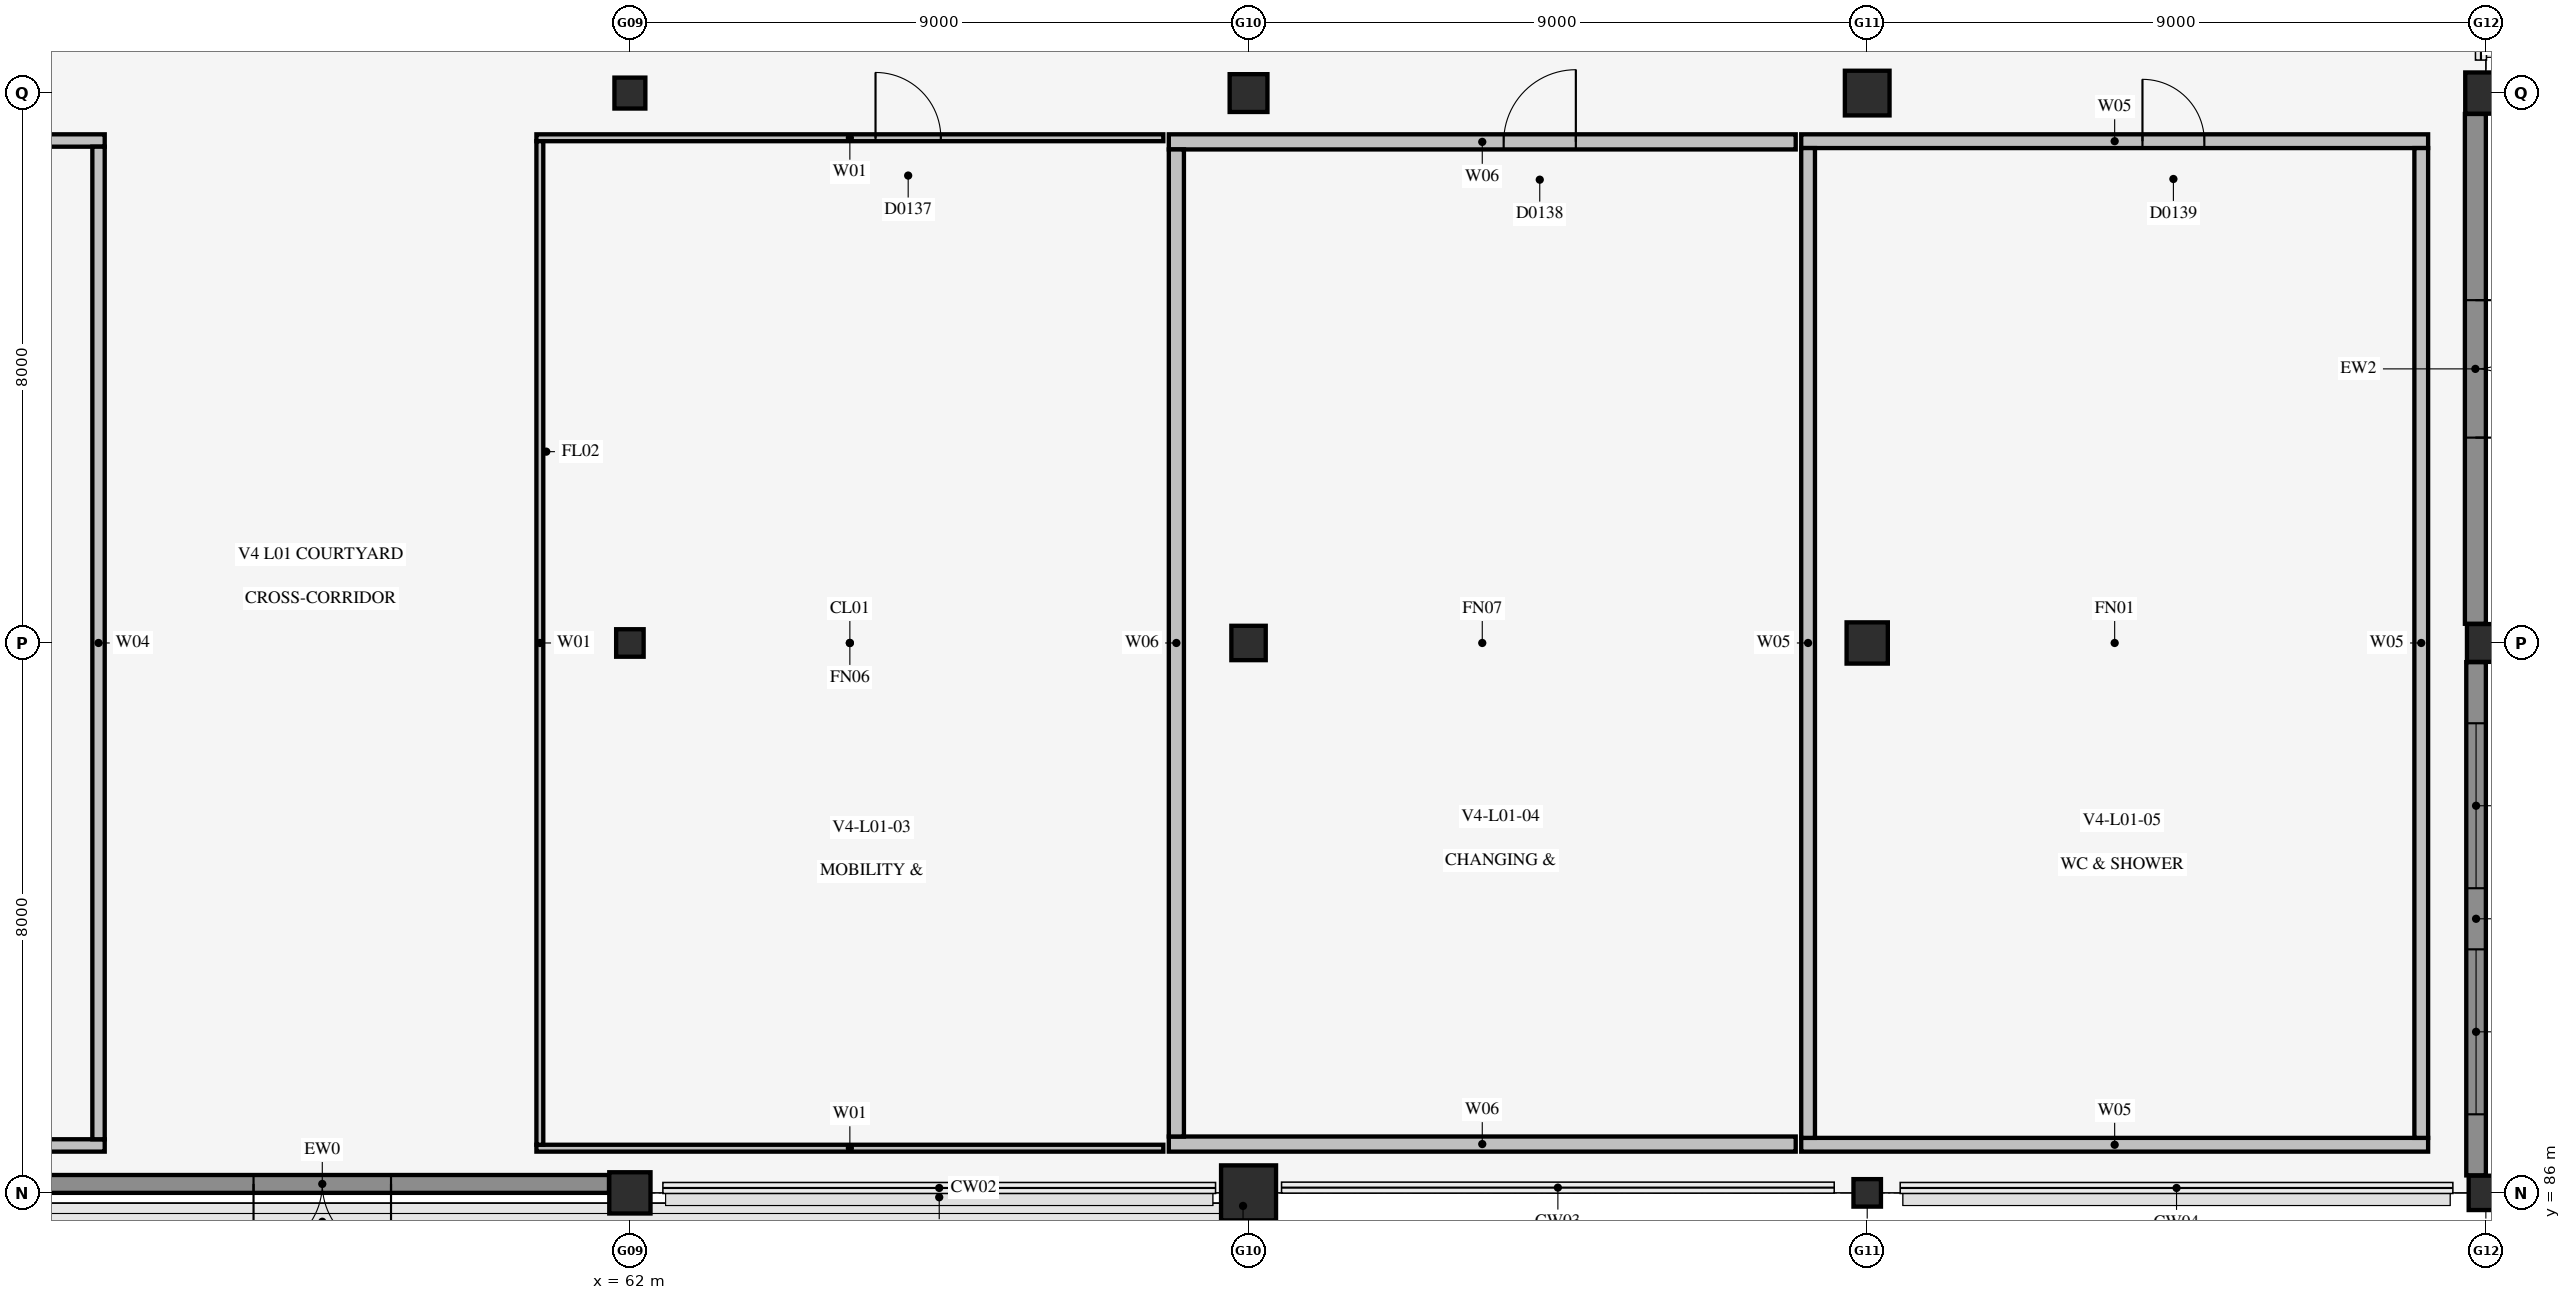
"""IFC4 building model, lengths in metres.
Left out: names, types, materials, properties, quantities, classifications, styles, units other than length and angle.
Written with IfcOpenShell. Run it as: python <this file> out.ifc"""

import sys

from ifc_helpers import new_model, si_unit, direction, frame, frame_2d, origin, origin_2d, place, context, subcontext, project, spatial, rectangle, circle, extrude, element, fill, save


model = new_model("IFC4")
c1 = context("Model", 3, precision=1e-05, world=origin(), true_north=direction((0.0, 1.0)))
c2 = subcontext(c1, "Body", "Model", "MODEL_VIEW")
j1 = project(units=[si_unit("LENGTHUNIT", "METRE"), si_unit("PLANEANGLEUNIT", "RADIAN")], contexts=[c1])
p1 = place(None, origin())
s1 = spatial("IfcSite", under=j1, at=p1, CompositionType="ELEMENT")
p2 = place(p1, origin())
s2 = spatial("IfcBuilding", under=s1, at=p2, CompositionType="ELEMENT")
p3 = place(p2, frame((0.0, 0.0, 5.4)))
s3 = spatial("IfcBuildingStorey", under=s2, at=p3, CompositionType="ELEMENT", Elevation=5.4)
p4 = place(p3, frame((62.0, 86.0, 0.0), z_axis=(0.0, 0.0, 1.0), x_axis=(1.0, 0.0, 0.0)))
e1 = element("IfcColumn", 1, at=p4, inside=s3, PredefinedType="COLUMN", context=c2, shape_type="SweptSolid", body=[
    extrude(circle(Radius=0.3, at=origin_2d()), origin(), (0.0, 0.0, 1.0), 4.5),
])
p5 = place(p3, frame((62.0, 94.0, 0.0), z_axis=(0.0, 0.0, 1.0), x_axis=(1.0, 0.0, 0.0)))
e2 = element("IfcColumn", 2, at=p5, inside=s3, PredefinedType="COLUMN", context=c2, shape_type="SweptSolid", body=[
    extrude(rectangle(XDim=0.4, YDim=0.4, at=origin_2d()), origin(), (0.0, 0.0, 1.0), 4.8),
])
p6 = place(p3, frame((62.0, 102.0, 0.0), z_axis=(0.0, 0.0, 1.0), x_axis=(1.0, 0.0, 0.0)))
e3 = element("IfcColumn", 3, at=p6, inside=s3, PredefinedType="COLUMN", context=c2, shape_type="SweptSolid", body=[
    extrude(rectangle(XDim=0.45, YDim=0.45, at=origin_2d()), origin(), (0.0, 0.0, 1.0), 4.8),
])
p7 = place(p3, frame((71.0, 86.0, 0.0), z_axis=(0.0, 0.0, 1.0), x_axis=(1.0, 0.0, 0.0)))
e4 = element("IfcColumn", 4, at=p7, inside=s3, PredefinedType="COLUMN", context=c2, shape_type="SweptSolid", body=[
    extrude(circle(Radius=0.4, at=origin_2d()), origin(), (0.0, 0.0, 1.0), 4.5),
])
p8 = place(p3, frame((71.0, 94.0, 0.0), z_axis=(0.0, 0.0, 1.0), x_axis=(1.0, 0.0, 0.0)))
e5 = element("IfcColumn", 5, at=p8, inside=s3, PredefinedType="COLUMN", context=c2, shape_type="SweptSolid", body=[
    extrude(rectangle(XDim=0.5, YDim=0.5, at=origin_2d()), origin(), (0.0, 0.0, 1.0), 4.5),
])
p9 = place(p3, frame((71.0, 102.0, 0.0), z_axis=(0.0, 0.0, 1.0), x_axis=(1.0, 0.0, 0.0)))
e6 = element("IfcColumn", 6, at=p9, inside=s3, PredefinedType="COLUMN", context=c2, shape_type="SweptSolid", body=[
    extrude(rectangle(XDim=0.55, YDim=0.55, at=origin_2d()), origin(), (0.0, 0.0, 1.0), 4.5),
])
p10 = place(p3, frame((80.0, 86.0, 0.0), z_axis=(0.0, 0.0, 1.0), x_axis=(1.0, 0.0, 0.0)))
e7 = element("IfcColumn", 7, at=p10, inside=s3, PredefinedType="COLUMN", context=c2, shape_type="SweptSolid", body=[
    extrude(rectangle(XDim=0.4, YDim=0.4, at=origin_2d()), origin(), (0.0, 0.0, 1.0), 4.5),
])
p11 = place(p3, frame((80.0, 94.0, 0.0), z_axis=(0.0, 0.0, 1.0), x_axis=(1.0, 0.0, 0.0)))
e8 = element("IfcColumn", 8, at=p11, inside=s3, PredefinedType="COLUMN", context=c2, shape_type="SweptSolid", body=[
    extrude(rectangle(XDim=0.6, YDim=0.6, at=origin_2d()), origin(), (0.0, 0.0, 1.0), 4.5),
])
p12 = place(p3, frame((80.0, 102.0, 0.0), z_axis=(0.0, 0.0, 1.0), x_axis=(1.0, 0.0, 0.0)))
e9 = element("IfcColumn", 9, at=p12, inside=s3, PredefinedType="COLUMN", context=c2, shape_type="SweptSolid", body=[
    extrude(rectangle(XDim=0.65, YDim=0.65, at=origin_2d()), origin(), (0.0, 0.0, 1.0), 4.5),
])
p13 = place(p3, frame((89.0, 86.0, 0.0), z_axis=(0.0, 0.0, 1.0), x_axis=(1.0, 0.0, 0.0)))
e10 = element("IfcColumn", 10, at=p13, inside=s3, PredefinedType="COLUMN", context=c2, shape_type="SweptSolid", body=[
    extrude(rectangle(XDim=0.5, YDim=0.5, at=origin_2d()), origin(), (0.0, 0.0, 1.0), 4.5),
])
p14 = place(p3, frame((89.0, 94.0, 0.0), z_axis=(0.0, 0.0, 1.0), x_axis=(1.0, 0.0, 0.0)))
e11 = element("IfcColumn", 11, at=p14, inside=s3, PredefinedType="COLUMN", context=c2, shape_type="SweptSolid", body=[
    extrude(rectangle(XDim=0.55, YDim=0.55, at=origin_2d()), origin(), (0.0, 0.0, 1.0), 4.5),
])
p15 = place(p3, frame((89.0, 102.0, 0.0), z_axis=(0.0, 0.0, 1.0), x_axis=(1.0, 0.0, 0.0)))
e12 = element("IfcColumn", 12, at=p15, inside=s3, PredefinedType="COLUMN", context=c2, shape_type="SweptSolid", body=[
    extrude(rectangle(XDim=0.6, YDim=0.6, at=origin_2d()), origin(), (0.0, 0.0, 1.0), 4.5),
])
p16 = place(p3, frame((32.64, 86.69, 0.0), z_axis=(0.0, 0.0, 1.0), x_axis=(1.0, 0.0, 0.0)))
e13 = element("IfcWall", 13, at=p16, inside=s3, PredefinedType="PARTITIONING", context=c2, shape_type="SweptSolid", body=[
    extrude(rectangle(XDim=21.72, YDim=0.18, at=frame_2d((10.86, 0.0))), origin(), (0.0, 0.0, 1.0), 4.485),
])
p17 = place(p3, frame((32.64, 101.31, 0.0), z_axis=(0.0, 0.0, 1.0), x_axis=(1.0, 0.0, 0.0)))
e14 = element("IfcWall", 14, at=p17, inside=s3, PredefinedType="PARTITIONING", context=c2, shape_type="SweptSolid", body=[
    extrude(rectangle(XDim=21.72, YDim=0.18, at=frame_2d((10.86, 0.0))), origin(), (0.0, 0.0, 1.0), 4.485),
])
p18 = place(p17, frame((8.006, 0.0, 0.0)))
e15 = element("IfcOpeningElement", 15, at=p18, cuts=e14, PredefinedType="OPENING", context=c2, shape_type="SweptSolid", body=[
    extrude(rectangle(XDim=1.0, YDim=2.2, at=frame_2d((0.5, 1.1))), frame((0.0, 0.102, 0.0), z_axis=(0.0, -1.0, 0.0), x_axis=(1.0, 0.0, 0.0)), (0.0, 0.0, 1.0), 0.204),
])
p19 = place(p3, frame((54.27, 86.78, 0.0), z_axis=(0.0, 0.0, 1.0), x_axis=(0.0, 1.0, 0.0)))
e16 = element("IfcWall", 16, at=p19, inside=s3, PredefinedType="PARTITIONING", context=c2, shape_type="SweptSolid", body=[
    extrude(rectangle(XDim=14.44, YDim=0.18, at=frame_2d((7.22, 0.0))), origin(), (0.0, 0.0, 1.0), 4.485),
])
p20 = place(p3, frame((60.64, 86.65, 0.0), z_axis=(0.0, 0.0, 1.0), x_axis=(1.0, 0.0, 0.0)))
e17 = element("IfcWall", 17, at=p20, inside=s3, PredefinedType="PARTITIONING", context=c2, shape_type="SweptSolid", body=[
    extrude(rectangle(XDim=9.12, YDim=0.1, at=frame_2d((4.56, 0.0))), origin(), (0.0, 0.0, 1.0), 4.485),
])
p21 = place(p3, frame((60.64, 101.35, 0.0), z_axis=(0.0, 0.0, 1.0), x_axis=(1.0, 0.0, 0.0)))
e18 = element("IfcWall", 18, at=p21, inside=s3, PredefinedType="PARTITIONING", context=c2, shape_type="SweptSolid", body=[
    extrude(rectangle(XDim=9.12, YDim=0.1, at=frame_2d((4.56, 0.0))), origin(), (0.0, 0.0, 1.0), 4.485),
])
p22 = place(p21, frame((4.933, 0.0, 0.0)))
e19 = element("IfcOpeningElement", 19, at=p22, cuts=e18, PredefinedType="OPENING", context=c2, shape_type="SweptSolid", body=[
    extrude(rectangle(XDim=0.95, YDim=2.15, at=frame_2d((0.475, 1.075))), frame((0.0, 0.062, 0.0), z_axis=(0.0, -1.0, 0.0), x_axis=(1.0, 0.0, 0.0)), (0.0, 0.0, 1.0), 0.124),
])
p23 = place(p3, frame((60.69, 86.7, 0.0), z_axis=(0.0, 0.0, 1.0), x_axis=(0.0, 1.0, 0.0)))
e20 = element("IfcWall", 20, at=p23, inside=s3, PredefinedType="PARTITIONING", context=c2, shape_type="SweptSolid", body=[
    extrude(rectangle(XDim=14.6, YDim=0.1, at=frame_2d((7.3, 0.0))), origin(), (0.0, 0.0, 1.0), 4.485),
])
p24 = place(p3, frame((69.84, 86.71, 0.0), z_axis=(0.0, 0.0, 1.0), x_axis=(1.0, 0.0, 0.0)))
e21 = element("IfcWall", 21, at=p24, inside=s3, PredefinedType="PLUMBINGWALL", context=c2, shape_type="SweptSolid", body=[
    extrude(rectangle(XDim=9.12, YDim=0.22, at=frame_2d((4.56, 0.0))), origin(), (0.0, 0.0, 1.0), 4.485),
])
p25 = place(p3, frame((69.84, 101.29, 0.0), z_axis=(0.0, 0.0, 1.0), x_axis=(1.0, 0.0, 0.0)))
e22 = element("IfcWall", 22, at=p25, inside=s3, PredefinedType="PLUMBINGWALL", context=c2, shape_type="SweptSolid", body=[
    extrude(rectangle(XDim=9.12, YDim=0.22, at=frame_2d((4.56, 0.0))), origin(), (0.0, 0.0, 1.0), 4.485),
])
p26 = place(p25, frame((4.871, 0.0, 0.0)))
e23 = element("IfcOpeningElement", 23, at=p26, cuts=e22, PredefinedType="OPENING", context=c2, shape_type="SweptSolid", body=[
    extrude(rectangle(XDim=1.05, YDim=2.15, at=frame_2d((0.525, 1.075))), frame((0.0, 0.122, 0.0), z_axis=(0.0, -1.0, 0.0), x_axis=(1.0, 0.0, 0.0)), (0.0, 0.0, 1.0), 0.244),
])
p27 = place(p3, frame((69.95, 86.82, 0.0), z_axis=(0.0, 0.0, 1.0), x_axis=(0.0, 1.0, 0.0)))
e24 = element("IfcWall", 24, at=p27, inside=s3, PredefinedType="PLUMBINGWALL", context=c2, shape_type="SweptSolid", body=[
    extrude(rectangle(XDim=14.36, YDim=0.22, at=frame_2d((7.18, 0.0))), origin(), (0.0, 0.0, 1.0), 4.485),
])
p28 = place(p3, frame((79.04, 86.7, 0.0), z_axis=(0.0, 0.0, 1.0), x_axis=(1.0, 0.0, 0.0)))
e25 = element("IfcWall", 25, at=p28, inside=s3, PredefinedType="PLUMBINGWALL", context=c2, shape_type="SweptSolid", body=[
    extrude(rectangle(XDim=9.12, YDim=0.2, at=frame_2d((4.56, 0.0))), origin(), (0.0, 0.0, 1.0), 4.485),
])
p29 = place(p3, frame((79.04, 101.3, 0.0), z_axis=(0.0, 0.0, 1.0), x_axis=(1.0, 0.0, 0.0)))
e26 = element("IfcWall", 26, at=p29, inside=s3, PredefinedType="PLUMBINGWALL", context=c2, shape_type="SweptSolid", body=[
    extrude(rectangle(XDim=9.12, YDim=0.2, at=frame_2d((4.56, 0.0))), origin(), (0.0, 0.0, 1.0), 4.485),
])
p30 = place(p29, frame((4.964, 0.0, 0.0)))
e27 = element("IfcOpeningElement", 27, at=p30, cuts=e26, PredefinedType="OPENING", context=c2, shape_type="SweptSolid", body=[
    extrude(rectangle(XDim=0.9, YDim=2.1, at=frame_2d((0.45, 1.05))), frame((0.0, 0.112, 0.0), z_axis=(0.0, -1.0, 0.0), x_axis=(1.0, 0.0, 0.0)), (0.0, 0.0, 1.0), 0.224),
])
for number, where, z_axis, x_axis in (
    (28, (88.06, 86.8, 0.0), (0.0, 0.0, 1.0), (0.0, 1.0, 0.0)),
    (29, (79.14, 86.8, 0.0), (0.0, 0.0, 1.0), (0.0, 1.0, 0.0)),
):
    element("IfcWall", number, at=place(p3, frame(where, z_axis=z_axis, x_axis=x_axis)), inside=s3, PredefinedType="PLUMBINGWALL", context=c2, shape_type="SweptSolid", body=[
        extrude(rectangle(XDim=14.4, YDim=0.2, at=frame_2d((7.2, 0.0))), origin(), (0.0, 0.0, 1.0), 4.485),
    ])
p31 = place(p3, frame((53.354, 86.13, 0.0), z_axis=(0.0, 0.0, 1.0), x_axis=(1.0, 0.0, 0.0)))
e30 = element("IfcWall", 30, at=p31, inside=s3, PredefinedType="SOLIDWALL", context=c2, shape_type="SweptSolid", body=[
    extrude(rectangle(XDim=8.342, YDim=0.26, at=frame_2d((4.171, 0.0))), origin(), (0.0, 0.0, 1.0), 3.934),
])
p32 = place(p31, frame((3.171, 0.0, 0.0)))
e31 = element("IfcOpeningElement", 31, at=p32, cuts=e30, PredefinedType="OPENING", context=c2, shape_type="SweptSolid", body=[
    extrude(rectangle(XDim=2.0, YDim=2.4, at=frame_2d((1.0, 1.2))), frame((0.0, 0.142, 0.0), z_axis=(0.0, -1.0, 0.0), x_axis=(1.0, 0.0, 0.0)), (0.0, 0.0, 1.0), 0.284),
])
p33 = place(p3, frame((88.857, 86.254, 0.0), z_axis=(0.0, 0.0, 1.0), x_axis=(0.0, 1.0, 0.0)))
e32 = element("IfcWall", 32, at=p33, inside=s3, PredefinedType="SOLIDWALL", context=c2, shape_type="SweptSolid", body=[
    extrude(rectangle(XDim=7.467, YDim=0.285, at=frame_2d((3.733, 0.0))), origin(), (0.0, 0.0, 1.0), 3.858),
])
p34 = place(p33, frame((0.889, 0.0, 0.95)))
e33 = element("IfcOpeningElement", 33, at=p34, cuts=e32, PredefinedType="OPENING", context=c2, shape_type="SweptSolid", body=[
    extrude(rectangle(XDim=2.4, YDim=2.1, at=frame_2d((1.2, 1.05))), frame((0.0, 0.154, 0.0), z_axis=(0.0, -1.0, 0.0), x_axis=(1.0, 0.0, 0.0)), (0.0, 0.0, 1.0), 0.309),
])
p35 = place(p33, frame((4.178, 0.0, 0.95)))
e34 = element("IfcOpeningElement", 34, at=p35, cuts=e32, PredefinedType="OPENING", context=c2, shape_type="SweptSolid", body=[
    extrude(rectangle(XDim=2.4, YDim=2.1, at=frame_2d((1.2, 1.05))), frame((0.0, 0.154, 0.0), z_axis=(0.0, -1.0, 0.0), x_axis=(1.0, 0.0, 0.0)), (0.0, 0.0, 1.0), 0.309),
])
p36 = place(p3, frame((88.847, 94.279, 0.0), z_axis=(0.0, 0.0, 1.0), x_axis=(0.0, 1.0, 0.0)))
e35 = element("IfcWall", 35, at=p36, inside=s3, PredefinedType="SOLIDWALL", context=c2, shape_type="SweptSolid", body=[
    extrude(rectangle(XDim=7.417, YDim=0.305, at=frame_2d((3.708, 0.0))), origin(), (0.0, 0.0, 1.0), 4.057),
])
p37 = place(p36, frame((2.708, 0.0, 0.0)))
e36 = element("IfcOpeningElement", 36, at=p37, cuts=e35, PredefinedType="OPENING", context=c2, shape_type="SweptSolid", body=[
    extrude(rectangle(XDim=2.0, YDim=2.4, at=frame_2d((1.0, 1.2))), frame((0.0, 0.165, 0.0), z_axis=(0.0, -1.0, 0.0), x_axis=(1.0, 0.0, 0.0)), (0.0, 0.0, 1.0), 0.329),
])
p38 = place(p22, frame((0.95, 0.0, 0.0), z_axis=(0.0, 0.0, 1.0), x_axis=(-1.0, 0.0, 0.0)))
e37 = element("IfcDoor", 37, at=p38, inside=s3, OperationType="SINGLE_SWING_LEFT", PredefinedType="DOOR", context=c2, shape_type="SweptSolid", body=[
    extrude(rectangle(XDim=0.95, YDim=2.15, at=frame_2d((0.475, 1.075))), frame((0.0, 0.025, 0.0), z_axis=(0.0, -1.0, 0.0), x_axis=(1.0, 0.0, 0.0)), (0.0, 0.0, 1.0), 0.05),
])
fill(e19, e37)
p39 = place(p26, frame((1.05, 0.0, 0.0), z_axis=(0.0, 0.0, 1.0), x_axis=(-1.0, 0.0, 0.0)))
e38 = element("IfcDoor", 38, at=p39, inside=s3, OperationType="SINGLE_SWING_RIGHT", PredefinedType="DOOR", context=c2, shape_type="SweptSolid", body=[
    extrude(rectangle(XDim=1.05, YDim=2.15, at=frame_2d((0.525, 1.075))), frame((0.0, 0.025, 0.0), z_axis=(0.0, -1.0, 0.0), x_axis=(1.0, 0.0, 0.0)), (0.0, 0.0, 1.0), 0.05),
])
fill(e23, e38)
p40 = place(p30, frame((0.9, 0.0, 0.0), z_axis=(0.0, 0.0, 1.0), x_axis=(-1.0, 0.0, 0.0)))
e39 = element("IfcDoor", 39, at=p40, inside=s3, OperationType="SINGLE_SWING_LEFT", PredefinedType="DOOR", context=c2, shape_type="SweptSolid", body=[
    extrude(rectangle(XDim=0.9, YDim=2.1, at=frame_2d((0.45, 1.05))), frame((0.0, 0.025, 0.0), z_axis=(0.0, -1.0, 0.0), x_axis=(1.0, 0.0, 0.0)), (0.0, 0.0, 1.0), 0.05),
])
fill(e27, e39)
p41 = place(p32, frame((2.0, 0.0, 0.0), z_axis=(0.0, 0.0, 1.0), x_axis=(-1.0, 0.0, 0.0)))
e40 = element("IfcDoor", 40, at=p41, inside=s3, OperationType="DOUBLE_DOOR_SINGLE_SWING", PredefinedType="DOOR", context=c2, shape_type="SweptSolid", body=[
    extrude(rectangle(XDim=2.0, YDim=2.4, at=frame_2d((1.0, 1.2))), frame((0.0, 0.025, 0.0), z_axis=(0.0, -1.0, 0.0), x_axis=(1.0, 0.0, 0.0)), (0.0, 0.0, 1.0), 0.05),
])
fill(e31, e40)
p42 = place(p34, origin())
e41 = element("IfcWindow", 41, at=p42, inside=s3, PartitioningType="SINGLE_PANEL", PredefinedType="WINDOW", context=c2, shape_type="SweptSolid", body=[
    extrude(rectangle(XDim=2.4, YDim=2.1, at=frame_2d((1.2, 1.05))), frame((0.0, 0.03, 0.0), z_axis=(0.0, -1.0, 0.0), x_axis=(1.0, 0.0, 0.0)), (0.0, 0.0, 1.0), 0.06),
])
fill(e33, e41)
p43 = place(p35, origin())
e42 = element("IfcWindow", 42, at=p43, inside=s3, PartitioningType="SINGLE_PANEL", PredefinedType="WINDOW", context=c2, shape_type="SweptSolid", body=[
    extrude(rectangle(XDim=2.4, YDim=2.1, at=frame_2d((1.2, 1.05))), frame((0.0, 0.03, 0.0), z_axis=(0.0, -1.0, 0.0), x_axis=(1.0, 0.0, 0.0)), (0.0, 0.0, 1.0), 0.06),
])
fill(e34, e42)
p44 = place(p37, frame((2.0, 0.0, 0.0), z_axis=(0.0, 0.0, 1.0), x_axis=(-1.0, 0.0, 0.0)))
e43 = element("IfcDoor", 43, at=p44, inside=s3, OperationType="DOUBLE_DOOR_SINGLE_SWING", PredefinedType="DOOR", context=c2, shape_type="SweptSolid", body=[
    extrude(rectangle(XDim=2.0, YDim=2.4, at=frame_2d((1.0, 1.2))), frame((0.0, 0.025, 0.0), z_axis=(0.0, -1.0, 0.0), x_axis=(1.0, 0.0, 0.0)), (0.0, 0.0, 1.0), 0.05),
])
fill(e36, e43)
save(model, sys.argv[1])
